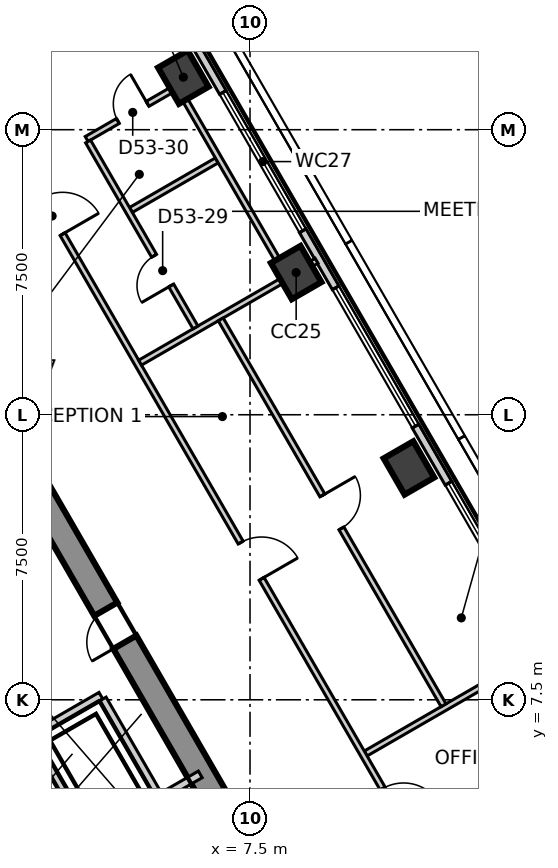
"""IFC4 building model, lengths in metres.
Left out: names, types, materials, properties, quantities, classifications, styles, units other than length and angle.
Written with IfcOpenShell. Run it as: python <this file> out.ifc"""

import sys

from ifc_helpers import new_model, si_unit, direction, frame, frame_2d, origin, origin_2d, place, context, subcontext, project, spatial, polyline, rectangle, outline, extrude, element, fill, save


model = new_model("IFC4")
c1 = context("Model", 3, precision=1e-05, world=origin(), true_north=direction((0.0, 1.0)))
c2 = subcontext(c1, "Body", "Model", "MODEL_VIEW")
j1 = project(units=[si_unit("LENGTHUNIT", "METRE"), si_unit("PLANEANGLEUNIT", "RADIAN")], contexts=[c1])
p1 = place(None, origin())
s1 = spatial("IfcSite", under=j1, at=p1, CompositionType="ELEMENT")
p2 = place(p1, origin())
s2 = spatial("IfcBuilding", under=s1, at=p2, CompositionType="ELEMENT")
p3 = place(p2, frame((0.0, 0.0, 227.3)))
s3 = spatial("IfcBuildingStorey", under=s2, at=p3, CompositionType="ELEMENT", Elevation=227.3)
p4 = place(p3, frame((12.413, -5.2, -0.3), z_axis=(0.0, 0.0, 1.0), x_axis=(-0.500011533395, 0.866018744874, 0.0)))
e1 = element("IfcWall", 1, at=p4, inside=s3, PredefinedType="SHEAR", context=c2, shape_type="SweptSolid", body=[
    extrude(outline(polyline([(-0.202, -0.35), (1.782, -0.35), (3.766, -0.35), (5.75, -0.35), (7.734, -0.35), (9.718, -0.35), (11.702, -0.35), (13.686, -0.35), (15.67, -0.35), (17.654, -0.35), (19.638, -0.35), (21.622, -0.35), (21.218, 0.35), (19.307, 0.35), (17.397, 0.35), (15.486, 0.35), (13.576, 0.35), (11.665, 0.35), (9.755, 0.35), (7.844, 0.35), (5.934, 0.35), (4.023, 0.35), (2.113, 0.35), (0.202, 0.35), (-0.202, -0.35)])), origin(), (0.0, 0.0, 1.0), 4.0),
])
p5 = place(p4, frame((4.055, 0.0, 0.3)))
e2 = element("IfcOpeningElement", 2, at=p5, cuts=e1, PredefinedType="OPENING", context=c2, shape_type="SweptSolid", body=[
    extrude(rectangle(XDim=0.9, YDim=2.1, at=frame_2d((0.45, 1.05))), frame((0.0, 0.36, 0.0), z_axis=(0.0, -1.0, 0.0), x_axis=(1.0, 0.0, 0.0)), (0.0, 0.0, 1.0), 0.72),
])
p6 = place(p4, frame((16.415, 0.0, 0.3)))
e3 = element("IfcOpeningElement", 3, at=p6, cuts=e1, PredefinedType="OPENING", context=c2, shape_type="SweptSolid", body=[
    extrude(rectangle(XDim=1.0, YDim=2.1, at=frame_2d((0.5, 1.05))), frame((0.0, 0.36, 0.0), z_axis=(0.0, -1.0, 0.0), x_axis=(1.0, 0.0, 0.0)), (0.0, 0.0, 1.0), 0.72),
])
for number, where, z_axis, x_axis in (
    (4, (11.682, 13.6, -0.3), (0.0, 0.0, 1.0), (-0.5, 0.866, 0.0)),
    (5, (8.714, 18.741, -0.3), (0.0, 0.0, 1.0), (-0.5, 0.866, 0.0)),
    (6, (5.745, 23.882, -0.3), (0.0, 0.0, 1.0), (-0.5, 0.866, 0.0)),
):
    element("IfcColumn", number, at=place(p3, frame(where, z_axis=z_axis, x_axis=x_axis)), inside=s3, PredefinedType="COLUMN", context=c2, shape_type="SweptSolid", body=[
        extrude(rectangle(XDim=1.1, YDim=0.9, at=origin_2d()), origin(), (0.0, 0.0, 1.0), 4.0),
    ])
p7 = place(p3, frame((27.782, -12.884, 0.0), z_axis=(0.0, 0.0, 1.0), x_axis=(-0.500023345841, 0.866011924637, 0.0)))
e7 = element("IfcWall", 7, at=p7, inside=s3, PredefinedType="ELEMENTEDWALL", context=c2, shape_type="SweptSolid", body=[
    extrude(rectangle(XDim=50.078, YDim=0.2, at=frame_2d((25.039, 0.0))), origin(), (0.0, 0.0, 1.0), 3.7),
])
p8 = place(p7, frame((2.171, 0.0, 0.9)))
e8 = element("IfcOpeningElement", 8, at=p8, cuts=e7, PredefinedType="OPENING", context=c2, shape_type="SweptSolid", body=[
    extrude(rectangle(XDim=4.2, YDim=2.5, at=frame_2d((2.1, 1.25))), frame((0.0, 0.11, 0.0), z_axis=(0.0, -1.0, 0.0), x_axis=(1.0, 0.0, 0.0)), (0.0, 0.0, 1.0), 0.22),
])
p9 = place(p7, frame((8.108, 0.0, 0.9)))
e9 = element("IfcOpeningElement", 9, at=p9, cuts=e7, PredefinedType="OPENING", context=c2, shape_type="SweptSolid", body=[
    extrude(rectangle(XDim=4.2, YDim=2.5, at=frame_2d((2.1, 1.25))), frame((0.0, 0.11, 0.0), z_axis=(0.0, -1.0, 0.0), x_axis=(1.0, 0.0, 0.0)), (0.0, 0.0, 1.0), 0.22),
])
p10 = place(p7, frame((14.044, 0.0, 0.9)))
e10 = element("IfcOpeningElement", 10, at=p10, cuts=e7, PredefinedType="OPENING", context=c2, shape_type="SweptSolid", body=[
    extrude(rectangle(XDim=4.2, YDim=2.5, at=frame_2d((2.1, 1.25))), frame((0.0, 0.11, 0.0), z_axis=(0.0, -1.0, 0.0), x_axis=(1.0, 0.0, 0.0)), (0.0, 0.0, 1.0), 0.22),
])
p11 = place(p7, frame((19.981, 0.0, 0.9)))
e11 = element("IfcOpeningElement", 11, at=p11, cuts=e7, PredefinedType="OPENING", context=c2, shape_type="SweptSolid", body=[
    extrude(rectangle(XDim=4.2, YDim=2.5, at=frame_2d((2.1, 1.25))), frame((0.0, 0.11, 0.0), z_axis=(0.0, -1.0, 0.0), x_axis=(1.0, 0.0, 0.0)), (0.0, 0.0, 1.0), 0.22),
])
p12 = place(p7, frame((25.917, 0.0, 0.9)))
e12 = element("IfcOpeningElement", 12, at=p12, cuts=e7, PredefinedType="OPENING", context=c2, shape_type="SweptSolid", body=[
    extrude(rectangle(XDim=4.2, YDim=2.5, at=frame_2d((2.1, 1.25))), frame((0.0, 0.11, 0.0), z_axis=(0.0, -1.0, 0.0), x_axis=(1.0, 0.0, 0.0)), (0.0, 0.0, 1.0), 0.22),
])
p13 = place(p7, frame((31.854, 0.0, 0.9)))
e13 = element("IfcOpeningElement", 13, at=p13, cuts=e7, PredefinedType="OPENING", context=c2, shape_type="SweptSolid", body=[
    extrude(rectangle(XDim=4.2, YDim=2.5, at=frame_2d((2.1, 1.25))), frame((0.0, 0.11, 0.0), z_axis=(0.0, -1.0, 0.0), x_axis=(1.0, 0.0, 0.0)), (0.0, 0.0, 1.0), 0.22),
])
p14 = place(p7, frame((37.79, 0.0, 0.9)))
e14 = element("IfcOpeningElement", 14, at=p14, cuts=e7, PredefinedType="OPENING", context=c2, shape_type="SweptSolid", body=[
    extrude(rectangle(XDim=4.2, YDim=2.5, at=frame_2d((2.1, 1.25))), frame((0.0, 0.11, 0.0), z_axis=(0.0, -1.0, 0.0), x_axis=(1.0, 0.0, 0.0)), (0.0, 0.0, 1.0), 0.22),
])
p15 = place(p7, frame((43.727, 0.0, 0.9)))
e15 = element("IfcOpeningElement", 15, at=p15, cuts=e7, PredefinedType="OPENING", context=c2, shape_type="SweptSolid", body=[
    extrude(rectangle(XDim=4.2, YDim=2.5, at=frame_2d((2.1, 1.25))), frame((0.0, 0.11, 0.0), z_axis=(0.0, -1.0, 0.0), x_axis=(1.0, 0.0, 0.0)), (0.0, 0.0, 1.0), 0.22),
])
p16 = place(p3, frame((10.544, 6.087, 0.0), z_axis=(0.0, 0.0, 1.0), x_axis=(0.866032438121, 0.499987815973, 0.0)))
e16 = element("IfcWall", 16, at=p16, inside=s3, PredefinedType="PARTITIONING", context=c2, shape_type="SweptSolid", body=[
    extrude(rectangle(XDim=5.363, YDim=0.15, at=frame_2d((2.681, 0.0))), origin(), (0.0, 0.0, 1.0), 3.2),
])
p17 = place(p3, frame((0.075, 24.07, 0.0), z_axis=(0.0, 0.0, 1.0), x_axis=(0.49999939571, -0.866025752671, 0.0)))
e17 = element("IfcWall", 17, at=p17, inside=s3, PredefinedType="PARTITIONING", context=c2, shape_type="SweptSolid", body=[
    extrude(rectangle(XDim=41.614, YDim=0.15, at=frame_2d((20.807, 0.0))), origin(), (0.0, 0.0, 1.0), 3.7),
])
p18 = place(p17, frame((36.714, 0.0, 0.0)))
e18 = element("IfcOpeningElement", 18, at=p18, cuts=e17, PredefinedType="OPENING", context=c2, shape_type="SweptSolid", body=[
    extrude(rectangle(XDim=1.1, YDim=2.1, at=frame_2d((0.55, 1.05))), frame((0.0, 0.085, 0.0), z_axis=(0.0, -1.0, 0.0), x_axis=(1.0, 0.0, 0.0)), (0.0, 0.0, 1.0), 0.17),
])
p19 = place(p17, frame((21.831, 0.0, 0.0)))
e19 = element("IfcOpeningElement", 19, at=p19, cuts=e17, PredefinedType="OPENING", context=c2, shape_type="SweptSolid", body=[
    extrude(rectangle(XDim=1.1, YDim=2.1, at=frame_2d((0.55, 1.05))), frame((0.0, 0.085, 0.0), z_axis=(0.0, -1.0, 0.0), x_axis=(1.0, 0.0, 0.0)), (0.0, 0.0, 1.0), 0.17),
])
p20 = place(p17, frame((30.631, 0.0, 0.0)))
e20 = element("IfcOpeningElement", 20, at=p20, cuts=e17, PredefinedType="OPENING", context=c2, shape_type="SweptSolid", body=[
    extrude(rectangle(XDim=0.9, YDim=2.1, at=frame_2d((0.45, 1.05))), frame((0.0, 0.085, 0.0), z_axis=(0.0, -1.0, 0.0), x_axis=(1.0, 0.0, 0.0)), (0.0, 0.0, 1.0), 0.17),
])
p21 = place(p17, frame((27.431, 0.0, 0.0)))
e21 = element("IfcOpeningElement", 21, at=p21, cuts=e17, PredefinedType="OPENING", context=c2, shape_type="SweptSolid", body=[
    extrude(rectangle(XDim=0.9, YDim=2.1, at=frame_2d((0.45, 1.05))), frame((0.0, 0.085, 0.0), z_axis=(0.0, -1.0, 0.0), x_axis=(1.0, 0.0, 0.0)), (0.0, 0.0, 1.0), 0.17),
])
p22 = place(p17, frame((24.631, 0.0, 0.0)))
e22 = element("IfcOpeningElement", 22, at=p22, cuts=e17, PredefinedType="OPENING", context=c2, shape_type="SweptSolid", body=[
    extrude(rectangle(XDim=1.0, YDim=2.1, at=frame_2d((0.5, 1.05))), frame((0.0, 0.085, 0.0), z_axis=(0.0, -1.0, 0.0), x_axis=(1.0, 0.0, 0.0)), (0.0, 0.0, 1.0), 0.17),
])
p23 = place(p17, frame((14.358, 0.0, 0.0)))
e23 = element("IfcOpeningElement", 23, at=p23, cuts=e17, PredefinedType="OPENING", context=c2, shape_type="SweptSolid", body=[
    extrude(rectangle(XDim=1.1, YDim=2.1, at=frame_2d((0.55, 1.05))), frame((0.0, 0.085, 0.0), z_axis=(0.0, -1.0, 0.0), x_axis=(1.0, 0.0, 0.0)), (0.0, 0.0, 1.0), 0.17),
])
p24 = place(p17, frame((3.885, 0.0, 0.0)))
e24 = element("IfcOpeningElement", 24, at=p24, cuts=e17, PredefinedType="OPENING", context=c2, shape_type="SweptSolid", body=[
    extrude(rectangle(XDim=1.1, YDim=2.1, at=frame_2d((0.55, 1.05))), frame((0.0, 0.085, 0.0), z_axis=(0.0, -1.0, 0.0), x_axis=(1.0, 0.0, 0.0)), (0.0, 0.0, 1.0), 0.17),
])
p25 = place(p3, frame((4.607, 16.37, 0.0), z_axis=(0.0, 0.0, 1.0), x_axis=(0.866052151752, 0.499953668299, 0.0)))
e25 = element("IfcWall", 25, at=p25, inside=s3, PredefinedType="PARTITIONING", context=c2, shape_type="SweptSolid", body=[
    extrude(rectangle(XDim=5.362, YDim=0.15, at=frame_2d((2.681, 0.0))), origin(), (0.0, 0.0, 1.0), 3.7),
])
p26 = place(p3, frame((4.366, 20.388, 0.0), z_axis=(0.0, 0.0, 1.0), x_axis=(0.8660749285, 0.499914210863, 0.0)))
e26 = element("IfcWall", 26, at=p26, inside=s3, PredefinedType="PARTITIONING", context=c2, shape_type="SweptSolid", body=[
    extrude(rectangle(XDim=2.608, YDim=0.15, at=frame_2d((1.304, 0.0))), origin(), (0.0, 0.0, 1.0), 3.7),
])
p27 = place(p3, frame((5.59, 23.635, 0.0), z_axis=(0.0, 0.0, 1.0), x_axis=(0.500037442639, -0.866003785188, 0.0)))
e27 = element("IfcWall", 27, at=p27, inside=s3, PredefinedType="PARTITIONING", context=c2, shape_type="SweptSolid", body=[
    extrude(rectangle(XDim=5.725, YDim=0.15, at=frame_2d((2.863, 0.0))), origin(), (0.0, 0.0, 1.0), 2.95),
])
p28 = place(p3, frame((3.201, 22.255, 0.0), z_axis=(0.0, 0.0, 1.0), x_axis=(0.865978018799, 0.500082064223, 0.0)))
e28 = element("IfcWall", 28, at=p28, inside=s3, PredefinedType="PARTITIONING", context=c2, shape_type="SweptSolid", body=[
    extrude(rectangle(XDim=2.684, YDim=0.15, at=frame_2d((1.342, 0.0))), origin(), (0.0, 0.0, 1.0), 3.7),
])
p29 = place(p28, frame((0.95, 0.0, 0.0)))
e29 = element("IfcOpeningElement", 29, at=p29, cuts=e28, PredefinedType="OPENING", context=c2, shape_type="SweptSolid", body=[
    extrude(rectangle(XDim=0.9, YDim=2.1, at=frame_2d((0.45, 1.05))), frame((0.0, 0.085, 0.0), z_axis=(0.0, -1.0, 0.0), x_axis=(1.0, 0.0, 0.0)), (0.0, 0.0, 1.0), 0.17),
])
p30 = place(p3, frame((3.239, 22.19, 0.0), z_axis=(0.0, 0.0, 1.0), x_axis=(0.500010476433, -0.866019355129, 0.0)))
e30 = element("IfcWall", 30, at=p30, inside=s3, PredefinedType="PARTITIONING", context=c2, shape_type="SweptSolid", body=[
    extrude(rectangle(XDim=5.65, YDim=0.15, at=frame_2d((2.825, 0.0))), origin(), (0.0, 0.0, 1.0), 3.7),
])
p31 = place(p30, frame((3.474, 0.0, 0.0)))
e31 = element("IfcOpeningElement", 31, at=p31, cuts=e30, PredefinedType="OPENING", context=c2, shape_type="SweptSolid", body=[
    extrude(rectangle(XDim=0.9, YDim=2.1, at=frame_2d((0.45, 1.05))), frame((0.0, 0.085, 0.0), z_axis=(0.0, -1.0, 0.0), x_axis=(1.0, 0.0, 0.0)), (0.0, 0.0, 1.0), 0.17),
])
p32 = place(p3, frame((6.73, 17.509, 0.0), z_axis=(0.0, 0.0, 1.0), x_axis=(0.500011469263, -0.866018781901, 0.0)))
e32 = element("IfcWall", 32, at=p32, inside=s3, PredefinedType="PARTITIONING", context=c2, shape_type="SweptSolid", body=[
    extrude(rectangle(XDim=11.724, YDim=0.15, at=frame_2d((5.862, 0.0))), origin(), (0.0, 0.0, 1.0), 3.7),
])
p33 = place(p32, frame((5.349, 0.0, 0.0)))
e33 = element("IfcOpeningElement", 33, at=p33, cuts=e32, PredefinedType="OPENING", context=c2, shape_type="SweptSolid", body=[
    extrude(rectangle(XDim=1.0, YDim=2.1, at=frame_2d((0.5, 1.05))), frame((0.0, 0.085, 0.0), z_axis=(0.0, -1.0, 0.0), x_axis=(1.0, 0.0, 0.0)), (0.0, 0.0, 1.0), 0.17),
])
p34 = place(p3, frame((-0.002, 5.541, 0.0), z_axis=(0.0, 0.0, 1.0), x_axis=(0.86600155993, 0.500041296494, 0.0)))
e34 = element("IfcWall", 34, at=p34, inside=s3, PredefinedType="SOLIDWALL", context=c2, shape_type="SweptSolid", body=[
    extrude(rectangle(XDim=4.132, YDim=0.2, at=frame_2d((2.066, 0.0))), origin(), (0.0, 0.0, 1.0), 3.7),
])
p35 = place(p3, frame((1.578, 2.874, 0.0), z_axis=(0.0, 0.0, 1.0), x_axis=(0.866045911672, 0.499964477614, 0.0)))
e35 = element("IfcWall", 35, at=p35, inside=s3, PredefinedType="SOLIDWALL", context=c2, shape_type="SweptSolid", body=[
    extrude(rectangle(XDim=5.327, YDim=0.2, at=frame_2d((2.663, 0.0))), origin(), (0.0, 0.0, 1.0), 3.7),
])
p36 = place(p35, frame((2.496, 0.0, 0.0)))
e36 = element("IfcOpeningElement", 36, at=p36, cuts=e35, PredefinedType="OPENING", context=c2, shape_type="SweptSolid", body=[
    extrude(rectangle(XDim=1.1, YDim=2.1, at=frame_2d((0.55, 1.05))), frame((0.0, 0.11, 0.0), z_axis=(0.0, -1.0, 0.0), x_axis=(1.0, 0.0, 0.0)), (0.0, 0.0, 1.0), 0.22),
])
for number, where, z_axis, x_axis in (
    (37, (3.626, 7.52, 0.0), (0.0, 0.0, 1.0), (0.5, -0.866, 0.0)),
    (38, (1.807, 6.47, 0.0), (0.0, 0.0, 1.0), (0.5, -0.866, 0.0)),
):
    element("IfcWall", number, at=place(p3, frame(where, z_axis=z_axis, x_axis=x_axis)), inside=s3, PredefinedType="SOLIDWALL", context=c2, shape_type="SweptSolid", body=[
        extrude(rectangle(XDim=2.9, YDim=0.2, at=frame_2d((1.45, 0.0))), origin(), (0.0, 0.0, 1.0), 3.7),
    ])
p37 = place(p12, origin())
e39 = element("IfcWindow", 39, at=p37, inside=s3, PartitioningType="SINGLE_PANEL", PredefinedType="WINDOW", context=c2, shape_type="SweptSolid", body=[
    extrude(rectangle(XDim=4.2, YDim=2.5, at=frame_2d((2.1, 1.25))), frame((0.0, 0.03, 0.0), z_axis=(0.0, -1.0, 0.0), x_axis=(1.0, 0.0, 0.0)), (0.0, 0.0, 1.0), 0.06),
])
fill(e12, e39)
p38 = place(p13, origin())
e40 = element("IfcWindow", 40, at=p38, inside=s3, PartitioningType="SINGLE_PANEL", PredefinedType="WINDOW", context=c2, shape_type="SweptSolid", body=[
    extrude(rectangle(XDim=4.2, YDim=2.5, at=frame_2d((2.1, 1.25))), frame((0.0, 0.03, 0.0), z_axis=(0.0, -1.0, 0.0), x_axis=(1.0, 0.0, 0.0)), (0.0, 0.0, 1.0), 0.06),
])
fill(e13, e40)
p39 = place(p14, origin())
e41 = element("IfcWindow", 41, at=p39, inside=s3, PartitioningType="SINGLE_PANEL", PredefinedType="WINDOW", context=c2, shape_type="SweptSolid", body=[
    extrude(rectangle(XDim=4.2, YDim=2.5, at=frame_2d((2.1, 1.25))), frame((0.0, 0.03, 0.0), z_axis=(0.0, -1.0, 0.0), x_axis=(1.0, 0.0, 0.0)), (0.0, 0.0, 1.0), 0.06),
])
fill(e14, e41)
p40 = place(p19, origin())
e42 = element("IfcDoor", 42, at=p40, inside=s3, OperationType="SINGLE_SWING_LEFT", PredefinedType="DOOR", context=c2, shape_type="SweptSolid", body=[
    extrude(rectangle(XDim=1.1, YDim=2.1, at=frame_2d((0.55, 1.05))), frame((0.0, 0.025, 0.0), z_axis=(0.0, -1.0, 0.0), x_axis=(1.0, 0.0, 0.0)), (0.0, 0.0, 1.0), 0.05),
])
fill(e19, e42)
p41 = place(p23, origin())
e43 = element("IfcDoor", 43, at=p41, inside=s3, OperationType="SINGLE_SWING_LEFT", PredefinedType="DOOR", context=c2, shape_type="SweptSolid", body=[
    extrude(rectangle(XDim=1.1, YDim=2.1, at=frame_2d((0.55, 1.05))), frame((0.0, 0.025, 0.0), z_axis=(0.0, -1.0, 0.0), x_axis=(1.0, 0.0, 0.0)), (0.0, 0.0, 1.0), 0.05),
])
fill(e23, e43)
p42 = place(p33, origin())
e44 = element("IfcDoor", 44, at=p42, inside=s3, OperationType="SINGLE_SWING_RIGHT", PredefinedType="DOOR", context=c2, shape_type="SweptSolid", body=[
    extrude(rectangle(XDim=1.0, YDim=2.1, at=frame_2d((0.5, 1.05))), frame((0.0, 0.025, 0.0), z_axis=(0.0, -1.0, 0.0), x_axis=(1.0, 0.0, 0.0)), (0.0, 0.0, 1.0), 0.05),
])
fill(e33, e44)
p43 = place(p24, origin())
e45 = element("IfcDoor", 45, at=p43, inside=s3, OperationType="SINGLE_SWING_LEFT", PredefinedType="DOOR", context=c2, shape_type="SweptSolid", body=[
    extrude(rectangle(XDim=1.1, YDim=2.1, at=frame_2d((0.55, 1.05))), frame((0.0, 0.025, 0.0), z_axis=(0.0, -1.0, 0.0), x_axis=(1.0, 0.0, 0.0)), (0.0, 0.0, 1.0), 0.05),
])
fill(e24, e45)
p44 = place(p31, origin())
e46 = element("IfcDoor", 46, at=p44, inside=s3, OperationType="SINGLE_SWING_RIGHT", PredefinedType="DOOR", context=c2, shape_type="SweptSolid", body=[
    extrude(rectangle(XDim=0.9, YDim=2.1, at=frame_2d((0.45, 1.05))), frame((0.0, 0.025, 0.0), z_axis=(0.0, -1.0, 0.0), x_axis=(1.0, 0.0, 0.0)), (0.0, 0.0, 1.0), 0.05),
])
fill(e31, e46)
p45 = place(p29, origin())
e47 = element("IfcDoor", 47, at=p45, inside=s3, OperationType="SINGLE_SWING_LEFT", PredefinedType="DOOR", context=c2, shape_type="SweptSolid", body=[
    extrude(rectangle(XDim=0.9, YDim=2.1, at=frame_2d((0.45, 1.05))), frame((0.0, 0.025, 0.0), z_axis=(0.0, -1.0, 0.0), x_axis=(1.0, 0.0, 0.0)), (0.0, 0.0, 1.0), 0.05),
])
fill(e29, e47)
p46 = place(p6, origin())
e48 = element("IfcDoor", 48, at=p46, inside=s3, OperationType="SINGLE_SWING_RIGHT", PredefinedType="DOOR", context=c2, shape_type="SweptSolid", body=[
    extrude(rectangle(XDim=1.0, YDim=2.1, at=frame_2d((0.5, 1.05))), frame((0.0, 0.025, 0.0), z_axis=(0.0, -1.0, 0.0), x_axis=(1.0, 0.0, 0.0)), (0.0, 0.0, 1.0), 0.05),
])
fill(e3, e48)
save(model, sys.argv[1])
